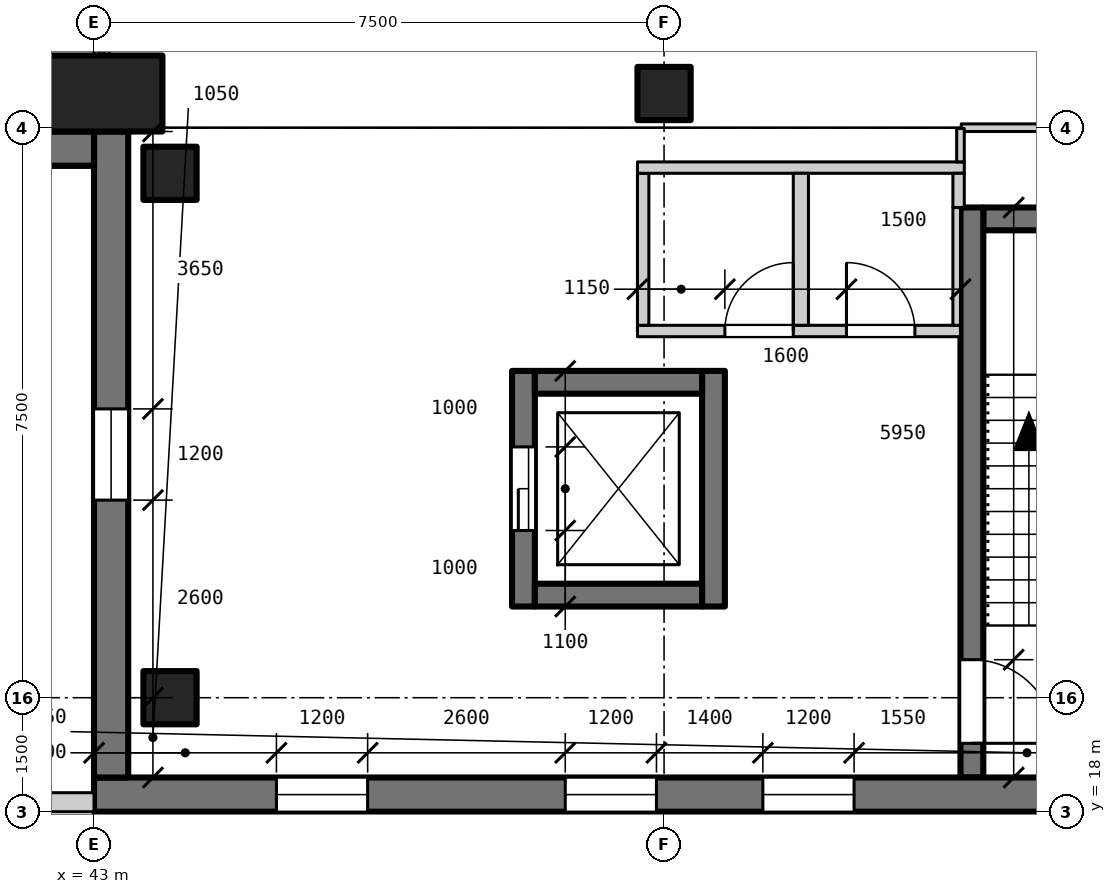
"""IFC4 building model, lengths in metres.
Left out: names, types, materials, properties, quantities, classifications, styles, units other than length and angle.
Written with IfcOpenShell. Run it as: python <this file> out.ifc"""

import sys

from ifc_helpers import new_model, si_unit, direction, frame, frame_2d, origin, origin_2d, place, context, subcontext, project, spatial, polyline, rectangle, outline, extrude, element, fill, save


model = new_model("IFC4")
c1 = context("Model", 3, precision=1e-05, world=origin(), true_north=direction((0.0, 1.0)))
c2 = subcontext(c1, "Body", "Model", "MODEL_VIEW")
j1 = project(units=[si_unit("LENGTHUNIT", "METRE"), si_unit("PLANEANGLEUNIT", "RADIAN")], contexts=[c1])
p1 = place(None, origin())
s1 = spatial("IfcSite", under=j1, at=p1, CompositionType="ELEMENT")
p2 = place(p1, origin())
s2 = spatial("IfcBuilding", under=s1, at=p2, CompositionType="ELEMENT")
p3 = place(p2, frame((0.0, 0.0, 6.0)))
s3 = spatial("IfcBuildingStorey", under=s2, at=p3, CompositionType="ELEMENT", Elevation=6.0)
for number, where, z_axis, x_axis in (
    (1, (50.5, 27.45, 0.0), (0.0, 0.0, 1.0), (1.0, 0.0, 0.0)),
    (2, (44.0, 19.5, 0.0), (0.0, 0.0, 1.0), (1.0, 0.0, 0.0)),
    (3, (44.0, 26.4, 0.0), (0.0, 0.0, 1.0), (1.0, 0.0, 0.0)),
):
    element("IfcColumn", number, at=place(p3, frame(where, z_axis=z_axis, x_axis=x_axis)), inside=s3, PredefinedType="COLUMN", context=c2, shape_type="SweptSolid", body=[
        extrude(rectangle(XDim=0.7, YDim=0.7, at=origin_2d()), origin(), (0.0, 0.0, 1.0), 4.2),
    ])
p4 = place(p3, frame((54.7, 25.8, 0.0), z_axis=(0.0, 0.0, 1.0), x_axis=(1.0, 0.0, 0.0)))
e4 = element("IfcWall", 4, at=p4, inside=s3, PredefinedType="SHEAR", context=c2, shape_type="SweptSolid", body=[
    extrude(rectangle(XDim=3.0, YDim=0.3, at=frame_2d((1.5, 0.0))), origin(), (0.0, 0.0, 1.0), 4.2),
])
p5 = place(p3, frame((54.55, 18.45, 0.0), z_axis=(0.0, 0.0, 1.0), x_axis=(0.0, 1.0, 0.0)))
e5 = element("IfcWall", 5, at=p5, inside=s3, PredefinedType="SHEAR", context=c2, shape_type="SweptSolid", body=[
    extrude(rectangle(XDim=7.5, YDim=0.3, at=frame_2d((3.75, 0.0))), origin(), (0.0, 0.0, 1.0), 4.2),
])
p6 = place(p5, frame((0.45, 0.0, 0.0)))
e6 = element("IfcOpeningElement", 6, at=p6, cuts=e5, PredefinedType="OPENING", context=c2, shape_type="SweptSolid", body=[
    extrude(rectangle(XDim=1.1, YDim=2.1, at=frame_2d((0.55, 1.05))), frame((0.0, 0.16, 0.0), z_axis=(0.0, -1.0, 0.0), x_axis=(1.0, 0.0, 0.0)), (0.0, 0.0, 1.0), 0.32),
])
p7 = place(p3, frame((48.65, 20.7, 0.0), z_axis=(0.0, 0.0, 1.0), x_axis=(0.0, 1.0, 0.0)))
e7 = element("IfcWall", 7, at=p7, inside=s3, PredefinedType="SHEAR", context=c2, shape_type="SweptSolid", body=[
    extrude(rectangle(XDim=3.1, YDim=0.3, at=frame_2d((1.55, 0.0))), origin(), (0.0, 0.0, 1.0), 4.2),
])
p8 = place(p7, frame((1.0, 0.0, 0.0)))
e8 = element("IfcOpeningElement", 8, at=p8, cuts=e7, PredefinedType="OPENING", context=c2, shape_type="SweptSolid", body=[
    extrude(rectangle(XDim=1.1, YDim=2.1, at=frame_2d((0.55, 1.05))), frame((0.0, 0.16, 0.0), z_axis=(0.0, -1.0, 0.0), x_axis=(1.0, 0.0, 0.0)), (0.0, 0.0, 1.0), 0.32),
])
p9 = place(p3, frame((51.15, 20.7, 0.0), z_axis=(0.0, 0.0, 1.0), x_axis=(0.0, 1.0, 0.0)))
e9 = element("IfcWall", 9, at=p9, inside=s3, PredefinedType="SHEAR", context=c2, shape_type="SweptSolid", body=[
    extrude(rectangle(XDim=3.1, YDim=0.3, at=frame_2d((1.55, 0.0))), origin(), (0.0, 0.0, 1.0), 4.2),
])
for number, where, z_axis, x_axis in (
    (10, (48.8, 20.85, 0.0), (0.0, 0.0, 1.0), (1.0, 0.0, 0.0)),
    (11, (48.8, 23.65, 0.0), (0.0, 0.0, 1.0), (1.0, 0.0, 0.0)),
):
    element("IfcWall", number, at=place(p3, frame(where, z_axis=z_axis, x_axis=x_axis)), inside=s3, PredefinedType="SHEAR", context=c2, shape_type="SweptSolid", body=[
        extrude(rectangle(XDim=2.2, YDim=0.3, at=frame_2d((1.1, 0.0))), origin(), (0.0, 0.0, 1.0), 4.2),
    ])
p10 = place(p3, frame((43.0, 27.45, 0.0), z_axis=(0.0, 0.0, 1.0), x_axis=(1.0, 0.0, 0.0)))
e12 = element("IfcColumn", 12, at=p10, inside=s3, PredefinedType="COLUMN", context=c2, shape_type="SweptSolid", body=[
    extrude(rectangle(XDim=1.8, YDim=1.0, at=origin_2d()), origin(), (0.0, 0.0, 1.0), 4.2),
])
p11 = place(p3, frame((43.0, 26.725, 0.0), z_axis=(0.0, 0.0, 1.0), x_axis=(-1.0, 0.0, 0.0)))
e13 = element("IfcWall", 13, at=p11, inside=s3, PredefinedType="SOLIDWALL", context=c2, shape_type="SweptSolid", body=[
    extrude(rectangle(XDim=28.0, YDim=0.45, at=frame_2d((14.0, 0.0))), origin(), (0.0, 0.0, 1.0), 1.2),
])
p12 = place(p3, frame((57.55, 18.225, 0.0), z_axis=(0.0, 0.0, 1.0), x_axis=(-1.0, 0.0, 0.0)))
e14 = element("IfcWall", 14, at=p12, inside=s3, PredefinedType="SOLIDWALL", context=c2, shape_type="SweptSolid", body=[
    extrude(rectangle(XDim=14.55, YDim=0.45, at=frame_2d((7.275, 0.0))), origin(), (0.0, 0.0, 1.0), 4.0),
])
p13 = place(p12, frame((4.55, 0.0, 0.9)))
e15 = element("IfcOpeningElement", 15, at=p13, cuts=e14, PredefinedType="OPENING", context=c2, shape_type="SweptSolid", body=[
    extrude(rectangle(XDim=1.2, YDim=1.5, at=frame_2d((0.6, 0.75))), frame((0.0, 0.235, 0.0), z_axis=(0.0, -1.0, 0.0), x_axis=(1.0, 0.0, 0.0)), (0.0, 0.0, 1.0), 0.47),
])
p14 = place(p12, frame((7.15, 0.0, 0.9)))
e16 = element("IfcOpeningElement", 16, at=p14, cuts=e14, PredefinedType="OPENING", context=c2, shape_type="SweptSolid", body=[
    extrude(rectangle(XDim=1.2, YDim=1.5, at=frame_2d((0.6, 0.75))), frame((0.0, 0.235, 0.0), z_axis=(0.0, -1.0, 0.0), x_axis=(1.0, 0.0, 0.0)), (0.0, 0.0, 1.0), 0.47),
])
p15 = place(p12, frame((10.95, 0.0, 0.9)))
e17 = element("IfcOpeningElement", 17, at=p15, cuts=e14, PredefinedType="OPENING", context=c2, shape_type="SweptSolid", body=[
    extrude(rectangle(XDim=1.2, YDim=1.5, at=frame_2d((0.6, 0.75))), frame((0.0, 0.235, 0.0), z_axis=(0.0, -1.0, 0.0), x_axis=(1.0, 0.0, 0.0)), (0.0, 0.0, 1.0), 0.47),
])
p16 = place(p3, frame((43.225, 18.45, 0.0), z_axis=(0.0, 0.0, 1.0), x_axis=(0.0, 1.0, 0.0)))
e18 = element("IfcWall", 18, at=p16, inside=s3, PredefinedType="SOLIDWALL", context=c2, shape_type="SweptSolid", body=[
    extrude(rectangle(XDim=8.5, YDim=0.45, at=frame_2d((4.25, 0.0))), origin(), (0.0, 0.0, 1.0), 4.0),
])
p17 = place(p16, frame((3.65, 0.0, 0.9)))
e19 = element("IfcOpeningElement", 19, at=p17, cuts=e18, PredefinedType="OPENING", context=c2, shape_type="SweptSolid", body=[
    extrude(rectangle(XDim=1.2, YDim=1.5, at=frame_2d((0.6, 0.75))), frame((0.0, 0.235, 0.0), z_axis=(0.0, -1.0, 0.0), x_axis=(1.0, 0.0, 0.0)), (0.0, 0.0, 1.0), 0.47),
])
p18 = place(p3, frame((43.0, 18.125, 0.0), z_axis=(0.0, 0.0, 1.0), x_axis=(-1.0, 0.0, 0.0)))
e20 = element("IfcWall", 20, at=p18, inside=s3, PredefinedType="PARAPET", context=c2, shape_type="SweptSolid", body=[
    extrude(rectangle(XDim=28.0, YDim=0.25, at=frame_2d((14.0, 0.0))), origin(), (0.0, 0.0, 1.0), 1.1),
])
p19 = place(p3, frame((43.0, 26.725, 1.2), z_axis=(0.0, 0.0, 1.0), x_axis=(-1.0, 0.0, 0.0)))
e21 = element("IfcWall", 21, at=p19, inside=s3, PredefinedType="SOLIDWALL", context=c2, shape_type="SweptSolid", body=[
    extrude(outline(polyline([(0.0, 0.0), (2.65, 0.0), (2.65, 19.837), (2.55, 19.763), (0.23, 15.969), (0.0, 14.733), (0.0, 0.0)])), frame((0.0, 0.225, 0.0), z_axis=(0.0, -1.0, 0.0), x_axis=(1.0, 0.0, 0.0)), (0.0, 0.0, 1.0), 0.45),
])
p20 = place(p3, frame((50.15, 24.325, 0.0), z_axis=(0.0, 0.0, 1.0), x_axis=(1.0, 0.0, 0.0)))
e22 = element("IfcWall", 22, at=p20, inside=s3, PredefinedType="PARTITIONING", context=c2, shape_type="SweptSolid", body=[
    extrude(rectangle(XDim=4.25, YDim=0.15, at=frame_2d((2.125, 0.0))), origin(), (0.0, 0.0, 1.0), 4.0),
])
p21 = place(p20, frame((1.15, 0.0, 0.0)))
e23 = element("IfcOpeningElement", 23, at=p21, cuts=e22, PredefinedType="OPENING", context=c2, shape_type="SweptSolid", body=[
    extrude(rectangle(XDim=0.9, YDim=2.1, at=frame_2d((0.45, 1.05))), frame((0.0, 0.085, 0.0), z_axis=(0.0, -1.0, 0.0), x_axis=(1.0, 0.0, 0.0)), (0.0, 0.0, 1.0), 0.17),
])
p22 = place(p20, frame((2.75, 0.0, 0.0)))
e24 = element("IfcOpeningElement", 24, at=p22, cuts=e22, PredefinedType="OPENING", context=c2, shape_type="SweptSolid", body=[
    extrude(rectangle(XDim=0.9, YDim=2.1, at=frame_2d((0.45, 1.05))), frame((0.0, 0.085, 0.0), z_axis=(0.0, -1.0, 0.0), x_axis=(1.0, 0.0, 0.0)), (0.0, 0.0, 1.0), 0.17),
])
p23 = place(p3, frame((50.225, 24.4, 0.0), z_axis=(0.0, 0.0, 1.0), x_axis=(0.0, 1.0, 0.0)))
e25 = element("IfcWall", 25, at=p23, inside=s3, PredefinedType="PARTITIONING", context=c2, shape_type="SweptSolid", body=[
    extrude(rectangle(XDim=2.0, YDim=0.15, at=frame_2d((1.0, 0.0))), origin(), (0.0, 0.0, 1.0), 4.0),
])
p24 = place(p3, frame((50.15, 26.475, 0.0), z_axis=(0.0, 0.0, 1.0), x_axis=(1.0, 0.0, 0.0)))
e26 = element("IfcWall", 26, at=p24, inside=s3, PredefinedType="PARTITIONING", context=c2, shape_type="SweptSolid", body=[
    extrude(rectangle(XDim=4.3, YDim=0.15, at=frame_2d((2.15, 0.0))), origin(), (0.0, 0.0, 1.0), 2.8),
])
p25 = place(p3, frame((52.3, 24.4, 0.0), z_axis=(0.0, 0.0, 1.0), x_axis=(0.0, 1.0, 0.0)))
e27 = element("IfcWall", 27, at=p25, inside=s3, PredefinedType="PARTITIONING", context=c2, shape_type="SweptSolid", body=[
    extrude(rectangle(XDim=2.0, YDim=0.2, at=frame_2d((1.0, 0.0))), origin(), (0.0, 0.0, 1.0), 4.0),
])
p26 = place(p3, frame((54.35, 24.4, 0.0), z_axis=(0.0, 0.0, 1.0), x_axis=(0.0, 1.0, 0.0)))
e28 = element("IfcWall", 28, at=p26, inside=s3, PredefinedType="PARTITIONING", context=c2, shape_type="SweptSolid", body=[
    extrude(rectangle(XDim=1.55, YDim=0.1, at=frame_2d((0.775, 0.0))), origin(), (0.0, 0.0, 1.0), 4.0),
])
p27 = place(p3, frame((54.375, 25.95, 0.0), z_axis=(0.0, 0.0, 1.0), x_axis=(0.0, 1.0, 0.0)))
e29 = element("IfcWall", 29, at=p27, inside=s3, PredefinedType="PARTITIONING", context=c2, shape_type="SweptSolid", body=[
    extrude(rectangle(XDim=0.45, YDim=0.15, at=frame_2d((0.225, 0.0))), origin(), (0.0, 0.0, 1.0), 4.0),
])
p28 = place(p3, frame((54.41, 27.0, 0.0), z_axis=(0.0, 0.0, 1.0), x_axis=(1.0, 0.0, 0.0)))
e30 = element("IfcWall", 30, at=p28, inside=s3, PredefinedType="PARTITIONING", context=c2, shape_type="SweptSolid", body=[
    extrude(rectangle(XDim=3.14, YDim=0.1, at=frame_2d((1.57, 0.0))), origin(), (0.0, 0.0, 1.0), 4.0),
])
p29 = place(p3, frame((54.4, 26.55, 0.0), z_axis=(0.0, 0.0, 1.0), x_axis=(0.0, 1.0, 0.0)))
e31 = element("IfcWall", 31, at=p29, inside=s3, PredefinedType="PARTITIONING", context=c2, shape_type="SweptSolid", body=[
    extrude(rectangle(XDim=0.44, YDim=0.1, at=frame_2d((0.22, 0.0))), origin(), (0.0, 0.0, 1.0), 4.0),
])
p30 = place(p13, origin())
e32 = element("IfcWindow", 32, at=p30, inside=s3, PartitioningType="SINGLE_PANEL", PredefinedType="WINDOW", context=c2, shape_type="SweptSolid", body=[
    extrude(rectangle(XDim=1.2, YDim=1.5, at=frame_2d((0.6, 0.75))), frame((0.0, -0.075, 0.0), z_axis=(0.0, -1.0, 0.0), x_axis=(1.0, 0.0, 0.0)), (0.0, 0.0, 1.0), 0.06),
])
fill(e15, e32)
p31 = place(p14, origin())
e33 = element("IfcWindow", 33, at=p31, inside=s3, PartitioningType="SINGLE_PANEL", PredefinedType="WINDOW", context=c2, shape_type="SweptSolid", body=[
    extrude(rectangle(XDim=1.2, YDim=1.5, at=frame_2d((0.6, 0.75))), frame((0.0, -0.075, 0.0), z_axis=(0.0, -1.0, 0.0), x_axis=(1.0, 0.0, 0.0)), (0.0, 0.0, 1.0), 0.06),
])
fill(e16, e33)
p32 = place(p15, origin())
e34 = element("IfcWindow", 34, at=p32, inside=s3, PartitioningType="SINGLE_PANEL", PredefinedType="WINDOW", context=c2, shape_type="SweptSolid", body=[
    extrude(rectangle(XDim=1.2, YDim=1.5, at=frame_2d((0.6, 0.75))), frame((0.0, -0.075, 0.0), z_axis=(0.0, -1.0, 0.0), x_axis=(1.0, 0.0, 0.0)), (0.0, 0.0, 1.0), 0.06),
])
fill(e17, e34)
p33 = place(p17, origin())
e35 = element("IfcWindow", 35, at=p33, inside=s3, PartitioningType="SINGLE_PANEL", PredefinedType="WINDOW", context=c2, shape_type="SweptSolid", body=[
    extrude(rectangle(XDim=1.2, YDim=1.5, at=frame_2d((0.6, 0.75))), frame((0.0, -0.075, 0.0), z_axis=(0.0, -1.0, 0.0), x_axis=(1.0, 0.0, 0.0)), (0.0, 0.0, 1.0), 0.06),
])
fill(e19, e35)
p34 = place(p21, origin())
e36 = element("IfcDoor", 36, at=p34, inside=s3, OperationType="SINGLE_SWING_RIGHT", PredefinedType="DOOR", context=c2, shape_type="SweptSolid", body=[
    extrude(rectangle(XDim=0.9, YDim=2.1, at=frame_2d((0.45, 1.05))), frame((0.0, 0.025, 0.0), z_axis=(0.0, -1.0, 0.0), x_axis=(1.0, 0.0, 0.0)), (0.0, 0.0, 1.0), 0.05),
])
fill(e23, e36)
p35 = place(p22, origin())
e37 = element("IfcDoor", 37, at=p35, inside=s3, OperationType="SINGLE_SWING_LEFT", PredefinedType="DOOR", context=c2, shape_type="SweptSolid", body=[
    extrude(rectangle(XDim=0.9, YDim=2.1, at=frame_2d((0.45, 1.05))), frame((0.0, 0.025, 0.0), z_axis=(0.0, -1.0, 0.0), x_axis=(1.0, 0.0, 0.0)), (0.0, 0.0, 1.0), 0.05),
])
fill(e24, e37)
p36 = place(p6, frame((1.1, 0.0, 0.0), z_axis=(0.0, 0.0, 1.0), x_axis=(-1.0, 0.0, 0.0)))
e38 = element("IfcDoor", 38, at=p36, inside=s3, OperationType="SINGLE_SWING_RIGHT", PredefinedType="DOOR", context=c2, shape_type="SweptSolid", body=[
    extrude(rectangle(XDim=1.1, YDim=2.1, at=frame_2d((0.55, 1.05))), frame((0.0, 0.025, 0.0), z_axis=(0.0, -1.0, 0.0), x_axis=(1.0, 0.0, 0.0)), (0.0, 0.0, 1.0), 0.05),
])
fill(e6, e38)
p37 = place(p8, origin())
e39 = element("IfcDoor", 39, at=p37, inside=s3, OperationType="SLIDING_TO_LEFT", PredefinedType="DOOR", context=c2, shape_type="SweptSolid", body=[
    extrude(rectangle(XDim=1.1, YDim=2.1, at=frame_2d((0.55, 1.05))), frame((0.0, 0.025, 0.0), z_axis=(0.0, -1.0, 0.0), x_axis=(1.0, 0.0, 0.0)), (0.0, 0.0, 1.0), 0.05),
])
fill(e8, e39)
save(model, sys.argv[1])
